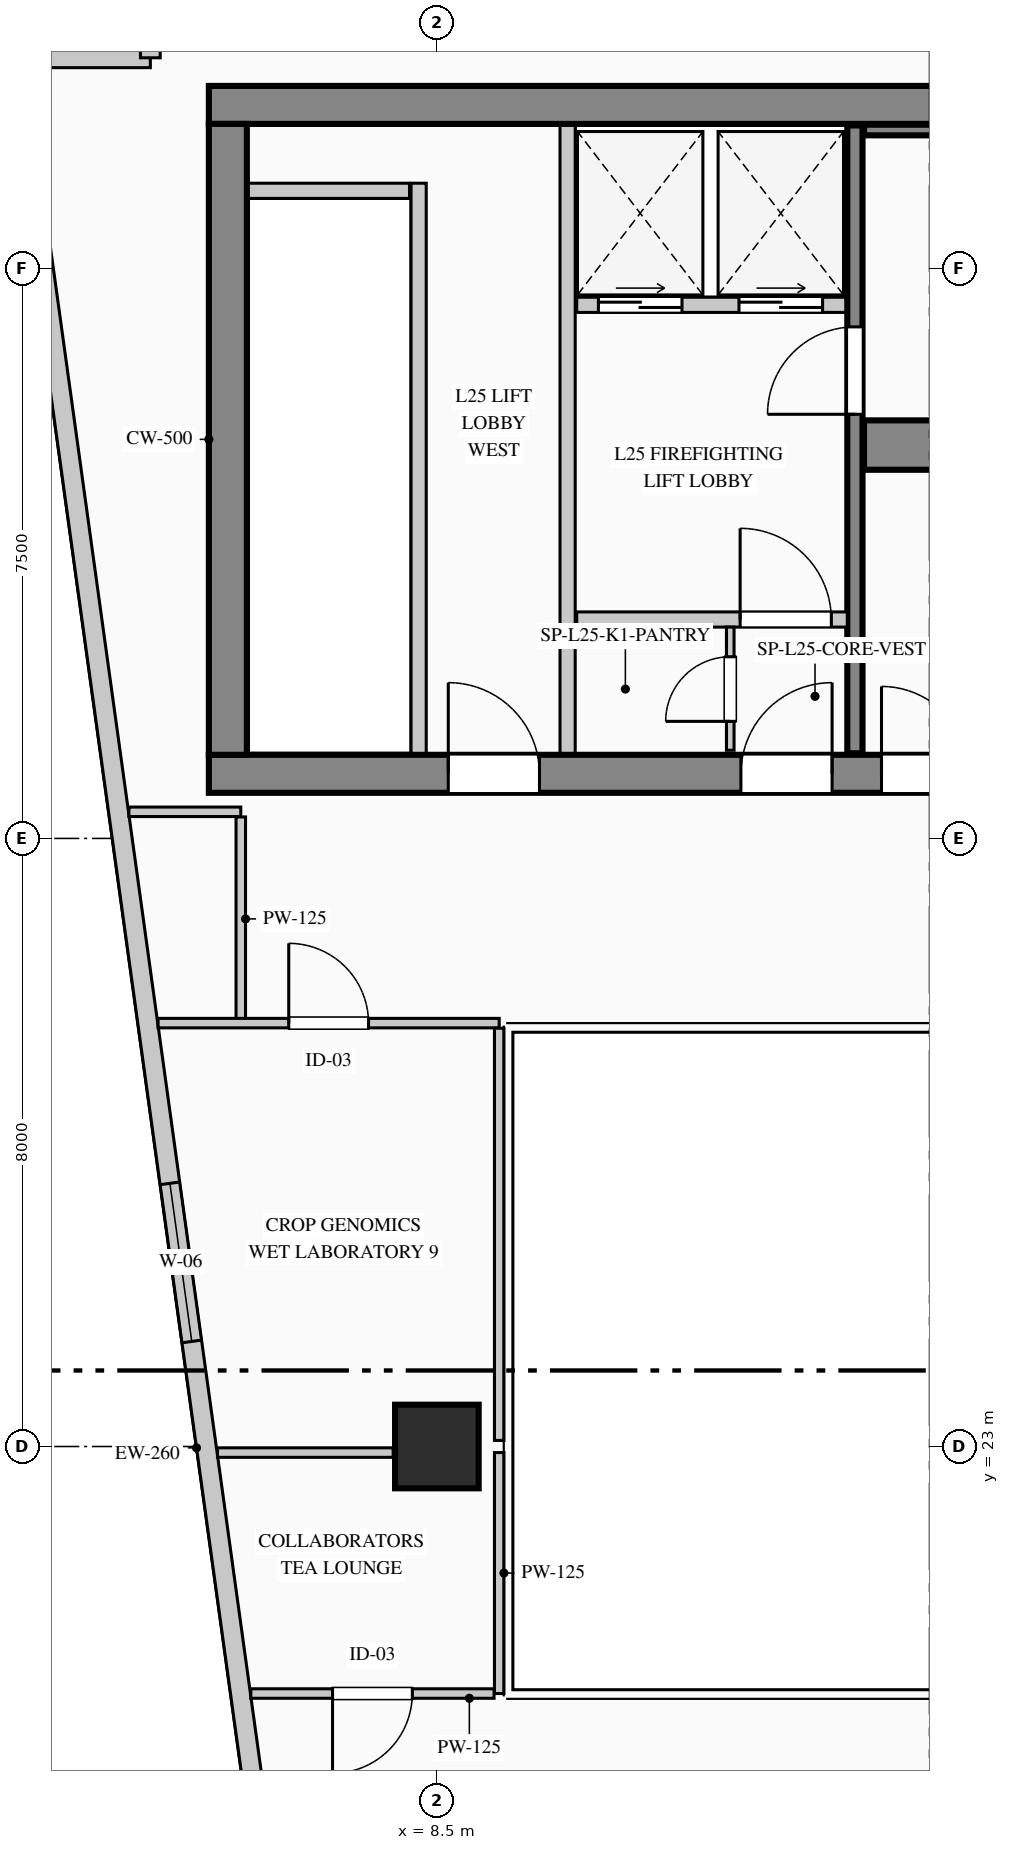
"""IFC4 building model, lengths in metres.
Left out: names, types, materials, properties, quantities, classifications, styles, units other than length and angle.
Written with IfcOpenShell. Run it as: python <this file> out.ifc"""

import sys

from ifc_helpers import new_model, si_unit, direction, frame, frame_2d, origin, origin_2d, place, context, subcontext, project, spatial, rectangle, extrude, element, fill, save


model = new_model("IFC4")
c1 = context("Model", 3, precision=1e-05, world=origin(), true_north=direction((0.0, 1.0)))
c2 = subcontext(c1, "Body", "Model", "MODEL_VIEW")
j1 = project(units=[si_unit("LENGTHUNIT", "METRE"), si_unit("PLANEANGLEUNIT", "RADIAN")], contexts=[c1])
p1 = place(None, origin())
s1 = spatial("IfcSite", under=j1, at=p1, CompositionType="ELEMENT")
p2 = place(p1, origin())
s2 = spatial("IfcBuilding", under=s1, at=p2, CompositionType="ELEMENT")
p3 = place(p2, frame((0.0, 0.0, 111.4)))
s3 = spatial("IfcBuildingStorey", under=s2, at=p3, CompositionType="ELEMENT", Elevation=111.4)
p4 = place(p3, frame((5.5, 40.65, 0.0), z_axis=(0.0, 0.0, 1.0), x_axis=(1.0, 0.0, 0.0)))
e1 = element("IfcWall", 1, at=p4, inside=s3, PredefinedType="SHEAR", context=c2, shape_type="SweptSolid", body=[
    extrude(rectangle(XDim=17.85, YDim=0.5, at=frame_2d((8.925, 0.0))), origin(), (0.0, 0.0, 1.0), 3.95),
])
p5 = place(p4, frame((15.945, 0.0, 0.0)))
e2 = element("IfcOpeningElement", 2, at=p5, cuts=e1, PredefinedType="OPENING", context=c2, shape_type="SweptSolid", body=[
    extrude(rectangle(XDim=1.18, YDim=2.25, at=frame_2d((0.59, 1.125))), frame((0.0, 0.26, 0.0), z_axis=(0.0, -1.0, 0.0), x_axis=(1.0, 0.0, 0.0)), (0.0, 0.0, 1.0), 0.52),
])
p6 = place(p3, frame((5.5, 31.85, 0.0), z_axis=(0.0, 0.0, 1.0), x_axis=(1.0, 0.0, 0.0)))
e3 = element("IfcWall", 3, at=p6, inside=s3, PredefinedType="SHEAR", context=c2, shape_type="SweptSolid", body=[
    extrude(rectangle(XDim=17.85, YDim=0.5, at=frame_2d((8.925, 0.0))), origin(), (0.0, 0.0, 1.0), 3.95),
])
p7 = place(p6, frame((3.15, 0.0, 0.0)))
e4 = element("IfcOpeningElement", 4, at=p7, cuts=e3, PredefinedType="OPENING", context=c2, shape_type="SweptSolid", body=[
    extrude(rectangle(XDim=1.2, YDim=2.2, at=frame_2d((0.6, 1.1))), frame((0.0, 0.26, 0.0), z_axis=(0.0, -1.0, 0.0), x_axis=(1.0, 0.0, 0.0)), (0.0, 0.0, 1.0), 0.52),
])
p8 = place(p6, frame((7.0, 0.0, 0.0)))
e5 = element("IfcOpeningElement", 5, at=p8, cuts=e3, PredefinedType="OPENING", context=c2, shape_type="SweptSolid", body=[
    extrude(rectangle(XDim=1.2, YDim=2.2, at=frame_2d((0.6, 1.1))), frame((0.0, 0.26, 0.0), z_axis=(0.0, -1.0, 0.0), x_axis=(1.0, 0.0, 0.0)), (0.0, 0.0, 1.0), 0.52),
])
p9 = place(p6, frame((8.85, 0.0, 0.0)))
e6 = element("IfcOpeningElement", 6, at=p9, cuts=e3, PredefinedType="OPENING", context=c2, shape_type="SweptSolid", body=[
    extrude(rectangle(XDim=1.15, YDim=2.2, at=frame_2d((0.575, 1.1))), frame((0.0, 0.26, 0.0), z_axis=(0.0, -1.0, 0.0), x_axis=(1.0, 0.0, 0.0)), (0.0, 0.0, 1.0), 0.52),
])
p10 = place(p6, frame((15.95, 0.0, 0.0)))
e7 = element("IfcOpeningElement", 7, at=p10, cuts=e3, PredefinedType="OPENING", context=c2, shape_type="SweptSolid", body=[
    extrude(rectangle(XDim=1.2, YDim=2.2, at=frame_2d((0.6, 1.1))), frame((0.0, 0.26, 0.0), z_axis=(0.0, -1.0, 0.0), x_axis=(1.0, 0.0, 0.0)), (0.0, 0.0, 1.0), 0.52),
])
p11 = place(p3, frame((5.75, 32.1, 0.0), z_axis=(0.0, 0.0, 1.0), x_axis=(0.0, 1.0, 0.0)))
e8 = element("IfcWall", 8, at=p11, inside=s3, PredefinedType="SHEAR", context=c2, shape_type="SweptSolid", body=[
    extrude(rectangle(XDim=8.3, YDim=0.5, at=frame_2d((4.15, 0.0))), origin(), (0.0, 0.0, 1.0), 3.95),
])
p12 = place(p3, frame((14.0, 32.12, 0.0), z_axis=(0.0, 0.0, 1.0), x_axis=(0.0, 1.0, 0.0)))
e9 = element("IfcWall", 9, at=p12, inside=s3, PredefinedType="SHEAR", context=c2, shape_type="SweptSolid", body=[
    extrude(rectangle(XDim=8.26, YDim=0.2, at=frame_2d((4.13, 0.0))), origin(), (0.0, 0.0, 1.0), 3.95),
])
p13 = place(p12, frame((4.46, 0.0, 0.0)))
e10 = element("IfcOpeningElement", 10, at=p13, cuts=e9, PredefinedType="OPENING", context=c2, shape_type="SweptSolid", body=[
    extrude(rectangle(XDim=1.15, YDim=2.2, at=frame_2d((0.575, 1.1))), frame((0.0, 0.11, 0.0), z_axis=(0.0, -1.0, 0.0), x_axis=(1.0, 0.0, 0.0)), (0.0, 0.0, 1.0), 0.22),
])
p14 = place(p3, frame((14.12, 36.175, 0.0), z_axis=(0.0, 0.0, 1.0), x_axis=(1.0, 0.0, 0.0)))
e11 = element("IfcWall", 11, at=p14, inside=s3, PredefinedType="SHEAR", context=c2, shape_type="SweptSolid", body=[
    extrude(rectangle(XDim=7.01, YDim=0.65, at=frame_2d((3.505, 0.0))), origin(), (0.0, 0.0, 1.0), 3.95),
])
p15 = place(p3, frame((14.12, 40.32, 0.0), z_axis=(0.0, 0.0, 1.0), x_axis=(1.0, 0.0, 0.0)))
e12 = element("IfcWall", 12, at=p15, inside=s3, PredefinedType="SHEAR", context=c2, shape_type="SweptSolid", body=[
    extrude(rectangle(XDim=7.01, YDim=0.14, at=frame_2d((3.505, 0.0))), origin(), (0.0, 0.0, 1.0), 3.95),
])
p16 = place(p3, frame((8.5, 23.0, 0.0), z_axis=(0.0, 0.0, 1.0), x_axis=(1.0, 0.0, 0.0)))
e13 = element("IfcColumn", 13, at=p16, inside=s3, PredefinedType="COLUMN", context=c2, shape_type="SweptSolid", body=[
    extrude(rectangle(XDim=1.1, YDim=1.1, at=origin_2d()), origin(), (0.0, 0.0, 1.0), 3.95),
])
p17 = place(p3, frame((7.993, 4.73, 0.0), z_axis=(0.0, 0.0, 1.0), x_axis=(-0.136989009016, 0.990572567462, 0.0)))
e14 = element("IfcWall", 14, at=p17, inside=s3, PredefinedType="STANDARD", context=c2, shape_type="SweptSolid", body=[
    extrude(rectangle(XDim=36.888, YDim=0.26, at=frame_2d((18.444, 0.0))), origin(), (0.0, 0.0, 1.0), 3.69),
])
p18 = place(p17, frame((19.839, 0.0, 0.9)))
e15 = element("IfcOpeningElement", 15, at=p18, cuts=e14, PredefinedType="OPENING", context=c2, shape_type="SweptSolid", body=[
    extrude(rectangle(XDim=2.1, YDim=2.0, at=frame_2d((1.05, 1.0))), frame((0.0, 0.14, 0.0), z_axis=(0.0, -1.0, 0.0), x_axis=(1.0, 0.0, 0.0)), (0.0, 0.0, 1.0), 0.28),
])
p19 = place(p3, frame((2.94, 41.27, 0.0), z_axis=(0.0, 0.0, 1.0), x_axis=(1.0, 0.0, 0.0)))
e16 = element("IfcWall", 16, at=p19, inside=s3, PredefinedType="STANDARD", context=c2, shape_type="SweptSolid", body=[
    extrude(rectangle(XDim=1.79, YDim=0.26, at=frame_2d((0.895, 0.0))), origin(), (0.0, 0.0, 1.0), 3.69),
])
p20 = place(p3, frame((4.73, 41.27, 0.0), z_axis=(0.0, 0.0, 1.0), x_axis=(0.0, 1.0, 0.0)))
e17 = element("IfcWall", 17, at=p20, inside=s3, PredefinedType="STANDARD", context=c2, shape_type="SweptSolid", body=[
    extrude(rectangle(XDim=2.1, YDim=0.26, at=frame_2d((1.05, 0.0))), origin(), (0.0, 0.0, 1.0), 3.69),
])
p21 = place(p3, frame((8.26, 32.12, 0.0), z_axis=(0.0, 0.0, 1.0), x_axis=(0.0, 1.0, 0.0)))
e18 = element("IfcWall", 18, at=p21, inside=s3, PredefinedType="PARTITIONING", context=c2, shape_type="SweptSolid", body=[
    extrude(rectangle(XDim=7.5, YDim=0.2, at=frame_2d((3.75, 0.0))), origin(), (0.0, 0.0, 1.0), 3.69),
])
p22 = place(p3, frame((6.02, 39.52, 0.0), z_axis=(0.0, 0.0, 1.0), x_axis=(1.0, 0.0, 0.0)))
e19 = element("IfcWall", 19, at=p22, inside=s3, PredefinedType="PARTITIONING", context=c2, shape_type="SweptSolid", body=[
    extrude(rectangle(XDim=2.12, YDim=0.2, at=frame_2d((1.06, 0.0))), origin(), (0.0, 0.0, 1.0), 3.69),
])
p23 = place(p3, frame((10.22, 32.12, 0.0), z_axis=(0.0, 0.0, 1.0), x_axis=(0.0, 1.0, 0.0)))
e20 = element("IfcWall", 20, at=p23, inside=s3, PredefinedType="PARTITIONING", context=c2, shape_type="SweptSolid", body=[
    extrude(rectangle(XDim=8.26, YDim=0.2, at=frame_2d((4.13, 0.0))), origin(), (0.0, 0.0, 1.0), 3.69),
])
p24 = place(p3, frame((10.34, 38.02, 0.0), z_axis=(0.0, 0.0, 1.0), x_axis=(1.0, 0.0, 0.0)))
e21 = element("IfcWall", 21, at=p24, inside=s3, PredefinedType="PARTITIONING", context=c2, shape_type="SweptSolid", body=[
    extrude(rectangle(XDim=3.54, YDim=0.2, at=frame_2d((1.77, 0.0))), origin(), (0.0, 0.0, 1.0), 3.69),
])
p25 = place(p24, frame((0.285, 0.0, 0.0)))
e22 = element("IfcOpeningElement", 22, at=p25, cuts=e21, PredefinedType="OPENING", context=c2, shape_type="SweptSolid", body=[
    extrude(rectangle(XDim=1.1, YDim=2.2, at=frame_2d((0.55, 1.1))), frame((0.0, 0.11, 0.0), z_axis=(0.0, -1.0, 0.0), x_axis=(1.0, 0.0, 0.0)), (0.0, 0.0, 1.0), 0.22),
])
p26 = place(p24, frame((2.135, 0.0, 0.0)))
e23 = element("IfcOpeningElement", 23, at=p26, cuts=e21, PredefinedType="OPENING", context=c2, shape_type="SweptSolid", body=[
    extrude(rectangle(XDim=1.1, YDim=2.2, at=frame_2d((0.55, 1.1))), frame((0.0, 0.11, 0.0), z_axis=(0.0, -1.0, 0.0), x_axis=(1.0, 0.0, 0.0)), (0.0, 0.0, 1.0), 0.22),
])
p27 = place(p3, frame((10.34, 33.88, 0.0), z_axis=(0.0, 0.0, 1.0), x_axis=(1.0, 0.0, 0.0)))
e24 = element("IfcWall", 24, at=p27, inside=s3, PredefinedType="PARTITIONING", context=c2, shape_type="SweptSolid", body=[
    extrude(rectangle(XDim=3.56, YDim=0.2, at=frame_2d((1.78, 0.0))), origin(), (0.0, 0.0, 1.0), 3.69),
])
p28 = place(p27, frame((2.15, 0.0, 0.0)))
e25 = element("IfcOpeningElement", 25, at=p28, cuts=e24, PredefinedType="OPENING", context=c2, shape_type="SweptSolid", body=[
    extrude(rectangle(XDim=1.2, YDim=2.2, at=frame_2d((0.6, 1.1))), frame((0.0, 0.11, 0.0), z_axis=(0.0, -1.0, 0.0), x_axis=(1.0, 0.0, 0.0)), (0.0, 0.0, 1.0), 0.22),
])
p29 = place(p3, frame((12.36, 32.16, 0.0), z_axis=(0.0, 0.0, 1.0), x_axis=(0.0, 1.0, 0.0)))
e26 = element("IfcWall", 26, at=p29, inside=s3, PredefinedType="PARTITIONING", context=c2, shape_type="SweptSolid", body=[
    extrude(rectangle(XDim=1.62, YDim=0.1, at=frame_2d((0.81, 0.0))), origin(), (0.0, 0.0, 1.0), 3.69),
])
p30 = place(p29, frame((0.38, 0.0, 0.0)))
e27 = element("IfcOpeningElement", 27, at=p30, cuts=e26, PredefinedType="OPENING", context=c2, shape_type="SweptSolid", body=[
    extrude(rectangle(XDim=0.85, YDim=2.1, at=frame_2d((0.425, 1.05))), frame((0.0, 0.06, 0.0), z_axis=(0.0, -1.0, 0.0), x_axis=(1.0, 0.0, 0.0)), (0.0, 0.0, 1.0), 0.12),
])
p31 = place(p3, frame((9.32, 22.92, 0.0), z_axis=(0.0, 0.0, 1.0), x_axis=(0.0, -1.0, 0.0)))
e28 = element("IfcWall", 28, at=p31, inside=s3, PredefinedType="PARTITIONING", context=c2, shape_type="SweptSolid", body=[
    extrude(rectangle(XDim=3.17, YDim=0.125, at=frame_2d((1.585, 0.0))), origin(), (0.0, 0.0, 1.0), 3.315),
])
p32 = place(p3, frame((9.252, 19.75, 0.0), z_axis=(0.0, 0.0, 1.0), x_axis=(-1.0, 0.0, 0.0)))
e29 = element("IfcWall", 29, at=p32, inside=s3, PredefinedType="PARTITIONING", context=c2, shape_type="SweptSolid", body=[
    extrude(rectangle(XDim=3.2, YDim=0.125, at=frame_2d((1.6, 0.0))), origin(), (0.0, 0.0, 1.0), 3.69),
])
p33 = place(p32, frame((1.075, 0.0, 0.0)))
e30 = element("IfcOpeningElement", 30, at=p33, cuts=e29, PredefinedType="OPENING", context=c2, shape_type="SweptSolid", body=[
    extrude(rectangle(XDim=1.05, YDim=2.15, at=frame_2d((0.525, 1.075))), frame((0.0, 0.073, 0.0), z_axis=(0.0, -1.0, 0.0), x_axis=(1.0, 0.0, 0.0)), (0.0, 0.0, 1.0), 0.145),
])
p34 = place(p3, frame((5.614, 22.92, 0.0), z_axis=(0.0, 0.0, 1.0), x_axis=(1.0, 0.0, 0.0)))
e31 = element("IfcWall", 31, at=p34, inside=s3, PredefinedType="PARTITIONING", context=c2, shape_type="SweptSolid", body=[
    extrude(rectangle(XDim=2.312, YDim=0.125, at=frame_2d((1.156, 0.0))), origin(), (0.0, 0.0, 1.0), 3.69),
])
p35 = place(p3, frame((4.448, 31.35, 0.0), z_axis=(0.0, 0.0, 1.0), x_axis=(1.0, 0.0, 0.0)))
e32 = element("IfcWall", 32, at=p35, inside=s3, PredefinedType="PARTITIONING", context=c2, shape_type="SweptSolid", body=[
    extrude(rectangle(XDim=1.472, YDim=0.125, at=frame_2d((0.736, 0.0))), origin(), (0.0, 0.0, 1.0), 3.69),
])
p36 = place(p3, frame((5.92, 31.282, 0.0), z_axis=(0.0, 0.0, 1.0), x_axis=(0.0, -1.0, 0.0)))
e33 = element("IfcWall", 33, at=p36, inside=s3, PredefinedType="PARTITIONING", context=c2, shape_type="SweptSolid", body=[
    extrude(rectangle(XDim=2.682, YDim=0.125, at=frame_2d((1.341, 0.0))), origin(), (0.0, 0.0, 1.0), 3.69),
])
p37 = place(p3, frame((4.832, 28.57, 0.0), z_axis=(0.0, 0.0, 1.0), x_axis=(1.0, 0.0, 0.0)))
e34 = element("IfcWall", 34, at=p37, inside=s3, PredefinedType="PARTITIONING", context=c2, shape_type="SweptSolid", body=[
    extrude(rectangle(XDim=4.488, YDim=0.125, at=frame_2d((2.244, 0.0))), origin(), (0.0, 0.0, 1.0), 3.69),
])
p38 = place(p37, frame((1.719, 0.0, 0.0)))
e35 = element("IfcOpeningElement", 35, at=p38, cuts=e34, PredefinedType="OPENING", context=c2, shape_type="SweptSolid", body=[
    extrude(rectangle(XDim=1.05, YDim=2.15, at=frame_2d((0.525, 1.075))), frame((0.0, 0.073, 0.0), z_axis=(0.0, -1.0, 0.0), x_axis=(1.0, 0.0, 0.0)), (0.0, 0.0, 1.0), 0.145),
])
p39 = place(p3, frame((9.32, 28.502, 0.0), z_axis=(0.0, 0.0, 1.0), x_axis=(0.0, -1.0, 0.0)))
e36 = element("IfcWall", 36, at=p39, inside=s3, PredefinedType="PARTITIONING", context=c2, shape_type="SweptSolid", body=[
    extrude(rectangle(XDim=5.422, YDim=0.125, at=frame_2d((2.711, 0.0))), origin(), (0.0, 0.0, 1.0), 3.315),
])
p40 = place(p18, origin())
e37 = element("IfcWindow", 37, at=p40, inside=s3, PartitioningType="DOUBLE_PANEL_VERTICAL", PredefinedType="WINDOW", context=c2, shape_type="SweptSolid", body=[
    extrude(rectangle(XDim=2.1, YDim=2.0, at=frame_2d((1.05, 1.0))), frame((0.0, 0.03, 0.0), z_axis=(0.0, -1.0, 0.0), x_axis=(1.0, 0.0, 0.0)), (0.0, 0.0, 1.0), 0.06),
])
fill(e15, e37)
p41 = place(p7, origin())
e38 = element("IfcDoor", 38, at=p41, inside=s3, OperationType="SINGLE_SWING_LEFT", PredefinedType="DOOR", context=c2, shape_type="SweptSolid", body=[
    extrude(rectangle(XDim=1.2, YDim=2.2, at=frame_2d((0.6, 1.1))), frame((0.0, 0.025, 0.0), z_axis=(0.0, -1.0, 0.0), x_axis=(1.0, 0.0, 0.0)), (0.0, 0.0, 1.0), 0.05),
])
fill(e4, e38)
p42 = place(p8, origin())
e39 = element("IfcDoor", 39, at=p42, inside=s3, OperationType="SINGLE_SWING_RIGHT", PredefinedType="DOOR", context=c2, shape_type="SweptSolid", body=[
    extrude(rectangle(XDim=1.2, YDim=2.2, at=frame_2d((0.6, 1.1))), frame((0.0, 0.025, 0.0), z_axis=(0.0, -1.0, 0.0), x_axis=(1.0, 0.0, 0.0)), (0.0, 0.0, 1.0), 0.05),
])
fill(e5, e39)
p43 = place(p9, origin())
e40 = element("IfcDoor", 40, at=p43, inside=s3, OperationType="SINGLE_SWING_LEFT", PredefinedType="DOOR", context=c2, shape_type="SweptSolid", body=[
    extrude(rectangle(XDim=1.15, YDim=2.2, at=frame_2d((0.575, 1.1))), frame((0.0, 0.025, 0.0), z_axis=(0.0, -1.0, 0.0), x_axis=(1.0, 0.0, 0.0)), (0.0, 0.0, 1.0), 0.05),
])
fill(e6, e40)
p44 = place(p28, origin())
e41 = element("IfcDoor", 41, at=p44, inside=s3, OperationType="SINGLE_SWING_LEFT", PredefinedType="DOOR", context=c2, shape_type="SweptSolid", body=[
    extrude(rectangle(XDim=1.2, YDim=2.2, at=frame_2d((0.6, 1.1))), frame((0.0, 0.025, 0.0), z_axis=(0.0, -1.0, 0.0), x_axis=(1.0, 0.0, 0.0)), (0.0, 0.0, 1.0), 0.05),
])
fill(e25, e41)
p45 = place(p30, origin())
e42 = element("IfcDoor", 42, at=p45, inside=s3, OperationType="SINGLE_SWING_LEFT", PredefinedType="DOOR", context=c2, shape_type="SweptSolid", body=[
    extrude(rectangle(XDim=0.85, YDim=2.1, at=frame_2d((0.425, 1.05))), frame((0.0, 0.025, 0.0), z_axis=(0.0, -1.0, 0.0), x_axis=(1.0, 0.0, 0.0)), (0.0, 0.0, 1.0), 0.05),
])
fill(e27, e42)
p46 = place(p13, origin())
e43 = element("IfcDoor", 43, at=p46, inside=s3, OperationType="SINGLE_SWING_LEFT", PredefinedType="DOOR", context=c2, shape_type="SweptSolid", body=[
    extrude(rectangle(XDim=1.15, YDim=2.2, at=frame_2d((0.575, 1.1))), frame((0.0, 0.025, 0.0), z_axis=(0.0, -1.0, 0.0), x_axis=(1.0, 0.0, 0.0)), (0.0, 0.0, 1.0), 0.05),
])
fill(e10, e43)
p47 = place(p25, origin())
e44 = element("IfcDoor", 44, at=p47, inside=s3, OperationType="DOUBLE_DOOR_SLIDING", PredefinedType="DOOR", context=c2, shape_type="SweptSolid", body=[
    extrude(rectangle(XDim=1.1, YDim=2.2, at=frame_2d((0.55, 1.1))), frame((0.0, 0.025, 0.0), z_axis=(0.0, -1.0, 0.0), x_axis=(1.0, 0.0, 0.0)), (0.0, 0.0, 1.0), 0.05),
])
fill(e22, e44)
p48 = place(p26, origin())
e45 = element("IfcDoor", 45, at=p48, inside=s3, OperationType="DOUBLE_DOOR_SLIDING", PredefinedType="DOOR", context=c2, shape_type="SweptSolid", body=[
    extrude(rectangle(XDim=1.1, YDim=2.2, at=frame_2d((0.55, 1.1))), frame((0.0, 0.025, 0.0), z_axis=(0.0, -1.0, 0.0), x_axis=(1.0, 0.0, 0.0)), (0.0, 0.0, 1.0), 0.05),
])
fill(e23, e45)
p49 = place(p33, origin())
e46 = element("IfcDoor", 46, at=p49, inside=s3, OperationType="SINGLE_SWING_RIGHT", PredefinedType="DOOR", context=c2, shape_type="SweptSolid", body=[
    extrude(rectangle(XDim=1.05, YDim=2.15, at=frame_2d((0.525, 1.075))), frame((0.0, 0.025, 0.0), z_axis=(0.0, -1.0, 0.0), x_axis=(1.0, 0.0, 0.0)), (0.0, 0.0, 1.0), 0.05),
])
fill(e30, e46)
p50 = place(p38, origin())
e47 = element("IfcDoor", 47, at=p50, inside=s3, OperationType="SINGLE_SWING_LEFT", PredefinedType="DOOR", context=c2, shape_type="SweptSolid", body=[
    extrude(rectangle(XDim=1.05, YDim=2.15, at=frame_2d((0.525, 1.075))), frame((0.0, 0.025, 0.0), z_axis=(0.0, -1.0, 0.0), x_axis=(1.0, 0.0, 0.0)), (0.0, 0.0, 1.0), 0.05),
])
fill(e35, e47)
save(model, sys.argv[1])
